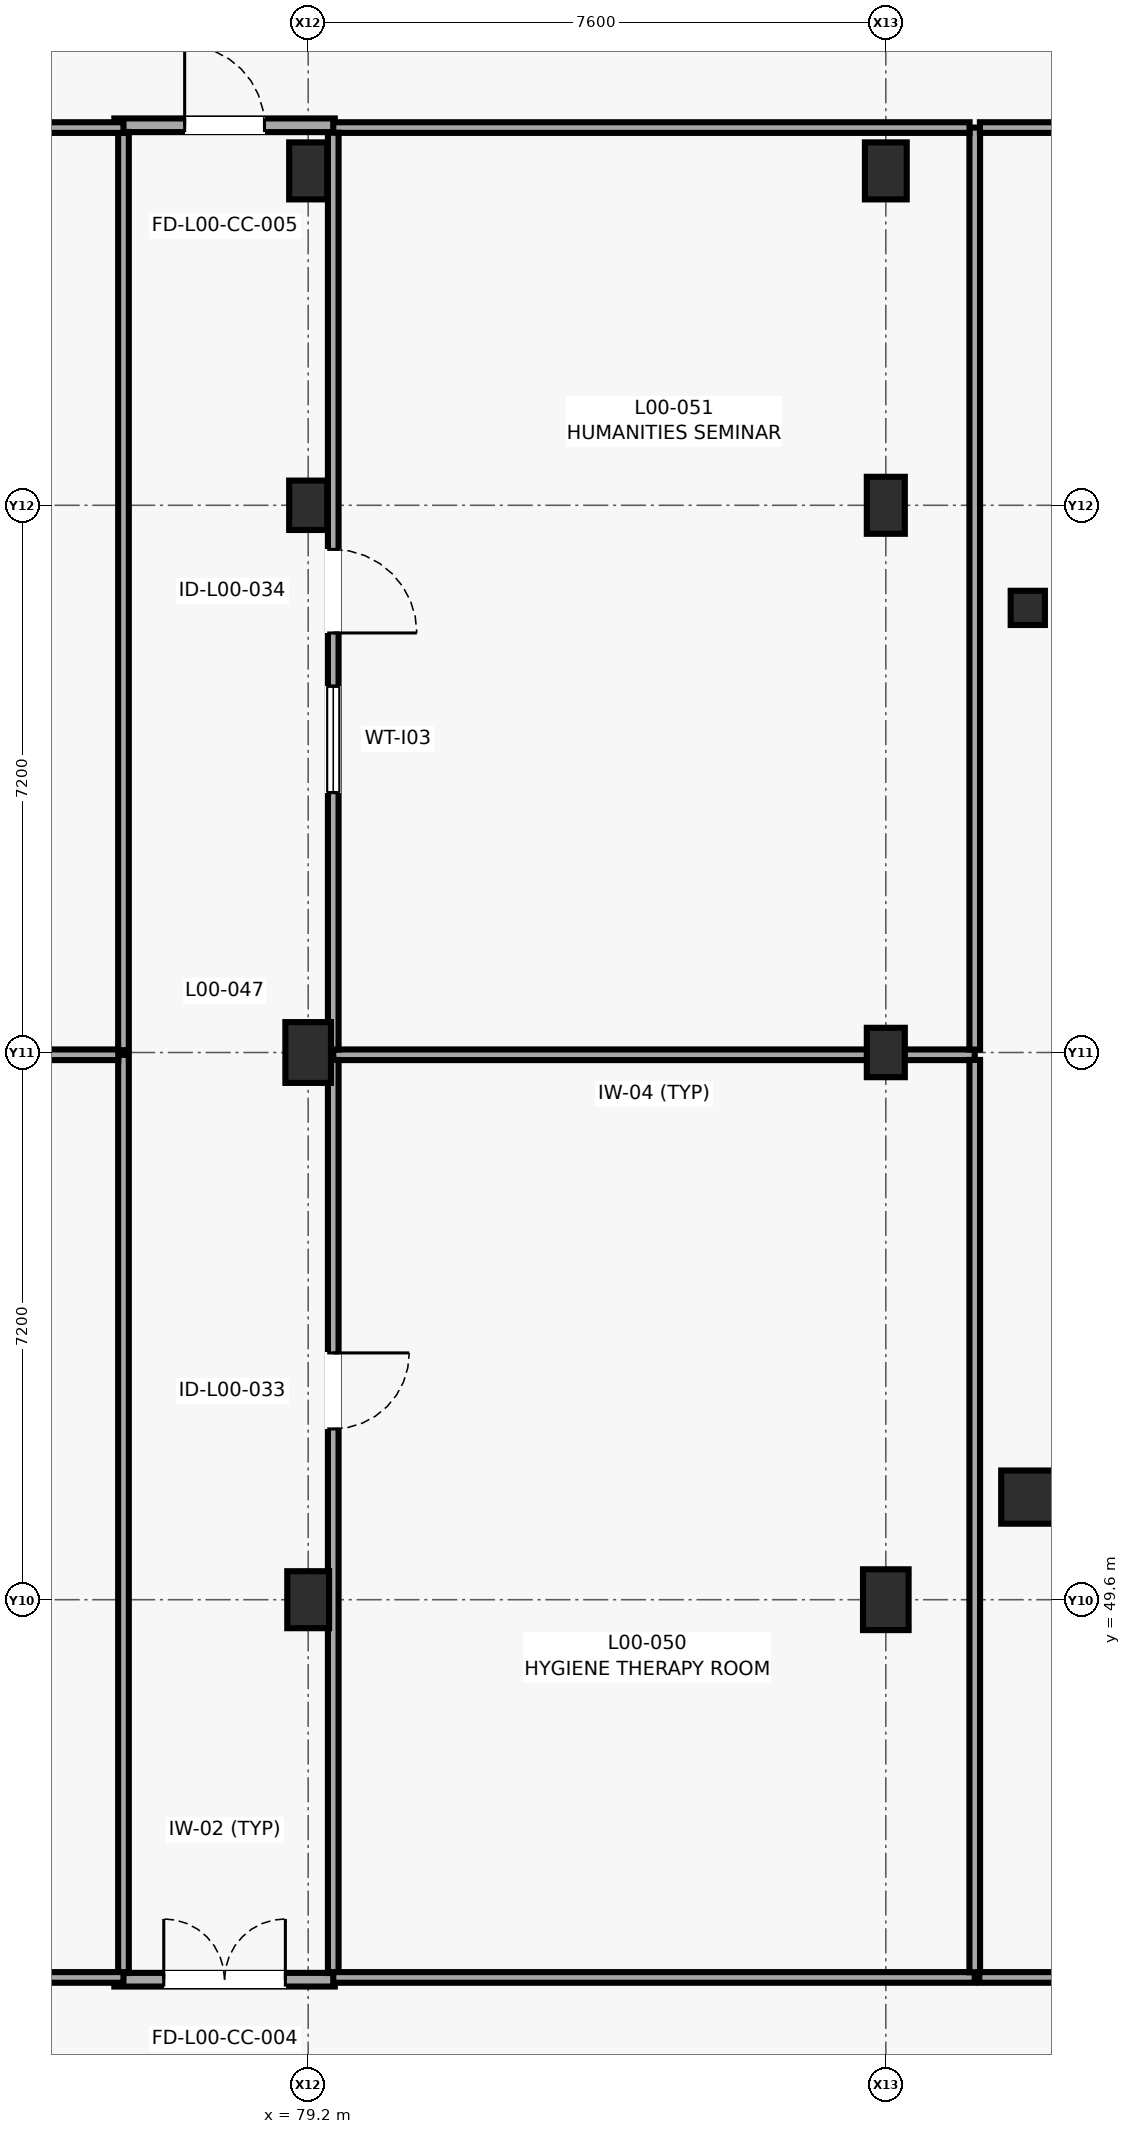
"""IFC4 building model, lengths in metres.
Left out: names, types, materials, properties, quantities, classifications, styles, units other than length and angle.
Written with IfcOpenShell. Run it as: python <this file> out.ifc"""

import sys

from ifc_helpers import new_model, si_unit, direction, frame, frame_2d, origin, origin_2d, place, context, subcontext, project, spatial, rectangle, circle, extrude, element, fill, save


model = new_model("IFC4")
c1 = context("Model", 3, precision=1e-05, world=origin(), true_north=direction((0.0, 1.0)))
c2 = subcontext(c1, "Body", "Model", "MODEL_VIEW")
j1 = project(units=[si_unit("LENGTHUNIT", "METRE"), si_unit("PLANEANGLEUNIT", "RADIAN")], contexts=[c1])
p1 = place(None, origin())
s1 = spatial("IfcSite", under=j1, at=p1, CompositionType="ELEMENT")
p2 = place(p1, origin())
s2 = spatial("IfcBuilding", under=s1, at=p2, CompositionType="ELEMENT")
p3 = place(p2, origin())
s3 = spatial("IfcBuildingStorey", under=s2, at=p3, CompositionType="ELEMENT", Elevation=0.0)
p4 = place(p3, frame((79.2, 49.6, 0.0), z_axis=(0.0, 0.0, 1.0), x_axis=(1.0, 0.0, 0.0)))
e1 = element("IfcColumn", 1, at=p4, inside=s3, PredefinedType="COLUMN", context=c2, shape_type="SweptSolid", body=[
    extrude(rectangle(XDim=0.55, YDim=0.75, at=origin_2d()), origin(), (0.0, 0.0, 1.0), 4.2),
])
p5 = place(p3, frame((79.2, 56.8, 0.0), z_axis=(0.0, 0.0, 1.0), x_axis=(1.0, 0.0, 0.0)))
e2 = element("IfcColumn", 2, at=p5, inside=s3, PredefinedType="COLUMN", context=c2, shape_type="SweptSolid", body=[
    extrude(rectangle(XDim=0.6, YDim=0.8, at=origin_2d()), origin(), (0.0, 0.0, 1.0), 4.2),
])
p6 = place(p3, frame((79.2, 64.0, 0.0), z_axis=(0.0, 0.0, 1.0), x_axis=(1.0, 0.0, 0.0)))
e3 = element("IfcColumn", 3, at=p6, inside=s3, PredefinedType="COLUMN", context=c2, shape_type="SweptSolid", body=[
    extrude(rectangle(XDim=0.5, YDim=0.65, at=origin_2d()), origin(), (0.0, 0.0, 1.0), 4.2),
])
p7 = place(p3, frame((79.2, 68.4, 0.0), z_axis=(0.0, 0.0, 1.0), x_axis=(1.0, 0.0, 0.0)))
e4 = element("IfcColumn", 4, at=p7, inside=s3, PredefinedType="COLUMN", context=c2, shape_type="SweptSolid", body=[
    extrude(rectangle(XDim=0.5, YDim=0.75, at=origin_2d()), origin(), (0.0, 0.0, 1.0), 4.2),
])
p8 = place(p3, frame((86.8, 49.6, 0.0), z_axis=(0.0, 0.0, 1.0), x_axis=(1.0, 0.0, 0.0)))
e5 = element("IfcColumn", 5, at=p8, inside=s3, PredefinedType="COLUMN", context=c2, shape_type="SweptSolid", body=[
    extrude(rectangle(XDim=0.6, YDim=0.8, at=origin_2d()), origin(), (0.0, 0.0, 1.0), 4.2),
])
p9 = place(p3, frame((86.8, 56.8, 0.0), z_axis=(0.0, 0.0, 1.0), x_axis=(1.0, 0.0, 0.0)))
e6 = element("IfcColumn", 6, at=p9, inside=s3, PredefinedType="COLUMN", context=c2, shape_type="SweptSolid", body=[
    extrude(rectangle(XDim=0.5, YDim=0.65, at=origin_2d()), origin(), (0.0, 0.0, 1.0), 4.2),
])
p10 = place(p3, frame((86.8, 64.0, 0.0), z_axis=(0.0, 0.0, 1.0), x_axis=(1.0, 0.0, 0.0)))
e7 = element("IfcColumn", 7, at=p10, inside=s3, PredefinedType="COLUMN", context=c2, shape_type="SweptSolid", body=[
    extrude(rectangle(XDim=0.5, YDim=0.75, at=origin_2d()), origin(), (0.0, 0.0, 1.0), 4.2),
])
p11 = place(p3, frame((86.8, 68.4, 0.0), z_axis=(0.0, 0.0, 1.0), x_axis=(1.0, 0.0, 0.0)))
e8 = element("IfcColumn", 8, at=p11, inside=s3, PredefinedType="COLUMN", context=c2, shape_type="SweptSolid", body=[
    extrude(rectangle(XDim=0.55, YDim=0.75, at=origin_2d()), origin(), (0.0, 0.0, 1.0), 4.2),
])
p12 = place(p3, frame((88.668, 50.95, 0.0), z_axis=(0.0, 0.0, 1.0), x_axis=(1.0, 0.0, 0.0)))
e9 = element("IfcColumn", 9, at=p12, inside=s3, PredefinedType="COLUMN", context=c2, shape_type="SweptSolid", body=[
    extrude(circle(Radius=0.35, at=origin_2d()), origin(), (0.0, 0.0, 1.0), 4.2),
])
p13 = place(p3, frame((88.668, 62.65, 0.0), z_axis=(0.0, 0.0, 1.0), x_axis=(1.0, 0.0, 0.0)))
e10 = element("IfcColumn", 10, at=p13, inside=s3, PredefinedType="COLUMN", context=c2, shape_type="SweptSolid", body=[
    extrude(circle(Radius=0.225, at=origin_2d()), origin(), (0.0, 0.0, 1.0), 4.2),
])
p14 = place(p3, frame((76.65, 44.6, 0.0), z_axis=(0.0, 0.0, 1.0), x_axis=(1.0, 0.0, 0.0)))
e11 = element("IfcWall", 11, at=p14, inside=s3, PredefinedType="PARTITIONING", context=c2, shape_type="SweptSolid", body=[
    extrude(rectangle(XDim=2.9, YDim=0.18, at=frame_2d((1.45, 0.0))), origin(), (0.0, 0.0, 1.0), 3.98),
])
p15 = place(p14, frame((0.65, 0.0, 0.0)))
e12 = element("IfcOpeningElement", 12, at=p15, cuts=e11, PredefinedType="OPENING", context=c2, shape_type="SweptSolid", body=[
    extrude(rectangle(XDim=1.6, YDim=2.25, at=frame_2d((0.8, 1.125))), frame((0.0, 0.1, 0.0), z_axis=(0.0, -1.0, 0.0), x_axis=(1.0, 0.0, 0.0)), (0.0, 0.0, 1.0), 0.2),
])
p16 = place(p3, frame((76.65, 69.0, 0.0), z_axis=(0.0, 0.0, 1.0), x_axis=(1.0, 0.0, 0.0)))
e13 = element("IfcWall", 13, at=p16, inside=s3, PredefinedType="PARTITIONING", context=c2, shape_type="SweptSolid", body=[
    extrude(rectangle(XDim=2.9, YDim=0.18, at=frame_2d((1.45, 0.0))), origin(), (0.0, 0.0, 1.0), 3.98),
])
p17 = place(p16, frame((0.925, 0.0, 0.0)))
e14 = element("IfcOpeningElement", 14, at=p17, cuts=e13, PredefinedType="OPENING", context=c2, shape_type="SweptSolid", body=[
    extrude(rectangle(XDim=1.05, YDim=2.15, at=frame_2d((0.525, 1.075))), frame((0.0, 0.1, 0.0), z_axis=(0.0, -1.0, 0.0), x_axis=(1.0, 0.0, 0.0)), (0.0, 0.0, 1.0), 0.2),
])
p18 = place(p3, frame((87.97, 56.77, 0.0), z_axis=(0.0, 0.0, 1.0), x_axis=(-1.0, 0.0, 0.0)))
e15 = element("IfcWall", 15, at=p18, inside=s3, PredefinedType="PARTITIONING", context=c2, shape_type="SweptSolid", body=[
    extrude(rectangle(XDim=8.44, YDim=0.14, at=frame_2d((4.22, 0.0))), origin(), (0.0, 0.0, 1.0), 3.225),
])
p19 = place(p3, frame((79.53, 56.702, 0.0), z_axis=(0.0, 0.0, 1.0), x_axis=(0.0, -1.0, 0.0)))
e16 = element("IfcWall", 16, at=p19, inside=s3, PredefinedType="PARTITIONING", context=c2, shape_type="SweptSolid", body=[
    extrude(rectangle(XDim=12.014, YDim=0.14, at=frame_2d((6.007, 0.0))), origin(), (0.0, 0.0, 1.0), 3.975),
])
p20 = place(p19, frame((3.855, 0.0, 0.0)))
e17 = element("IfcOpeningElement", 17, at=p20, cuts=e16, PredefinedType="OPENING", context=c2, shape_type="SweptSolid", body=[
    extrude(rectangle(XDim=1.0, YDim=2.1, at=frame_2d((0.5, 1.05))), frame((0.0, 0.08, 0.0), z_axis=(0.0, -1.0, 0.0), x_axis=(1.0, 0.0, 0.0)), (0.0, 0.0, 1.0), 0.16),
])
p21 = place(p3, frame((79.53, 44.63, 0.0), z_axis=(0.0, 0.0, 1.0), x_axis=(1.0, 0.0, 0.0)))
e18 = element("IfcWall", 18, at=p21, inside=s3, PredefinedType="PARTITIONING", context=c2, shape_type="SweptSolid", body=[
    extrude(rectangle(XDim=8.44, YDim=0.14, at=frame_2d((4.22, 0.0))), origin(), (0.0, 0.0, 1.0), 3.975),
])
p22 = place(p3, frame((87.97, 44.698, 0.0), z_axis=(0.0, 0.0, 1.0), x_axis=(0.0, 1.0, 0.0)))
e19 = element("IfcWall", 19, at=p22, inside=s3, PredefinedType="PARTITIONING", context=c2, shape_type="SweptSolid", body=[
    extrude(rectangle(XDim=12.004, YDim=0.14, at=frame_2d((6.002, 0.0))), origin(), (0.0, 0.0, 1.0), 3.975),
])
p23 = place(p3, frame((87.97, 56.838, 0.0), z_axis=(0.0, 0.0, 1.0), x_axis=(0.0, 1.0, 0.0)))
e20 = element("IfcWall", 20, at=p23, inside=s3, PredefinedType="PARTITIONING", context=c2, shape_type="SweptSolid", body=[
    extrude(rectangle(XDim=12.132, YDim=0.14, at=frame_2d((6.066, 0.0))), origin(), (0.0, 0.0, 1.0), 3.975),
])
p24 = place(p3, frame((87.902, 68.97, 0.0), z_axis=(0.0, 0.0, 1.0), x_axis=(-1.0, 0.0, 0.0)))
e21 = element("IfcWall", 21, at=p24, inside=s3, PredefinedType="PARTITIONING", context=c2, shape_type="SweptSolid", body=[
    extrude(rectangle(XDim=8.372, YDim=0.14, at=frame_2d((4.186, 0.0))), origin(), (0.0, 0.0, 1.0), 3.975),
])
p25 = place(p3, frame((79.53, 68.902, 0.0), z_axis=(0.0, 0.0, 1.0), x_axis=(0.0, -1.0, 0.0)))
e22 = element("IfcWall", 22, at=p25, inside=s3, PredefinedType="PARTITIONING", context=c2, shape_type="SweptSolid", body=[
    extrude(rectangle(XDim=12.064, YDim=0.14, at=frame_2d((6.032, 0.0))), origin(), (0.0, 0.0, 1.0), 3.975),
])
p26 = place(p25, frame((5.482, 0.0, 0.0)))
e23 = element("IfcOpeningElement", 23, at=p26, cuts=e22, PredefinedType="OPENING", context=c2, shape_type="SweptSolid", body=[
    extrude(rectangle(XDim=1.1, YDim=2.1, at=frame_2d((0.55, 1.05))), frame((0.0, 0.08, 0.0), z_axis=(0.0, -1.0, 0.0), x_axis=(1.0, 0.0, 0.0)), (0.0, 0.0, 1.0), 0.16),
])
p27 = place(p25, frame((7.282, 0.0, 1.05)))
e24 = element("IfcOpeningElement", 24, at=p27, cuts=e22, PredefinedType="OPENING", context=c2, shape_type="SweptSolid", body=[
    extrude(rectangle(XDim=1.4, YDim=1.05, at=frame_2d((0.7, 0.525))), frame((0.0, 0.08, 0.0), z_axis=(0.0, -1.0, 0.0), x_axis=(1.0, 0.0, 0.0)), (0.0, 0.0, 1.0), 0.16),
])
p28 = place(p3, frame((76.77, 44.688, 0.0), z_axis=(0.0, 0.0, 1.0), x_axis=(0.0, 1.0, 0.0)))
e25 = element("IfcWall", 25, at=p28, inside=s3, PredefinedType="PARTITIONING", context=c2, shape_type="SweptSolid", body=[
    extrude(rectangle(XDim=12.082, YDim=0.14, at=frame_2d((6.041, 0.0))), origin(), (0.0, 0.0, 1.0), 3.975),
])
p29 = place(p3, frame((76.702, 56.77, 0.0), z_axis=(0.0, 0.0, 1.0), x_axis=(-1.0, 0.0, 0.0)))
e26 = element("IfcWall", 26, at=p29, inside=s3, PredefinedType="PARTITIONING", context=c2, shape_type="SweptSolid", body=[
    extrude(rectangle(XDim=2.086, YDim=0.14, at=frame_2d((1.043, 0.0))), origin(), (0.0, 0.0, 1.0), 3.975),
])
p30 = place(p3, frame((63.43, 44.63, 0.0), z_axis=(0.0, 0.0, 1.0), x_axis=(1.0, 0.0, 0.0)))
e27 = element("IfcWall", 27, at=p30, inside=s3, PredefinedType="PARTITIONING", context=c2, shape_type="SweptSolid", body=[
    extrude(rectangle(XDim=13.34, YDim=0.14, at=frame_2d((6.67, 0.0))), origin(), (0.0, 0.0, 1.0), 3.975),
])
p31 = place(p30, frame((6.12, 0.0, 0.0)))
e28 = element("IfcOpeningElement", 28, at=p31, cuts=e27, PredefinedType="OPENING", context=c2, shape_type="SweptSolid", body=[
    extrude(rectangle(XDim=1.1, YDim=2.1, at=frame_2d((0.55, 1.05))), frame((0.0, 0.08, 0.0), z_axis=(0.0, -1.0, 0.0), x_axis=(1.0, 0.0, 0.0)), (0.0, 0.0, 1.0), 0.16),
])
p32 = place(p30, frame((7.92, 0.0, 1.05)))
e29 = element("IfcOpeningElement", 29, at=p32, cuts=e27, PredefinedType="OPENING", context=c2, shape_type="SweptSolid", body=[
    extrude(rectangle(XDim=1.4, YDim=1.05, at=frame_2d((0.7, 0.525))), frame((0.0, 0.08, 0.0), z_axis=(0.0, -1.0, 0.0), x_axis=(1.0, 0.0, 0.0)), (0.0, 0.0, 1.0), 0.16),
])
p33 = place(p3, frame((76.77, 56.83, 0.0), z_axis=(0.0, 0.0, 1.0), x_axis=(0.0, 1.0, 0.0)))
e30 = element("IfcWall", 30, at=p33, inside=s3, PredefinedType="PARTITIONING", context=c2, shape_type="SweptSolid", body=[
    extrude(rectangle(XDim=12.082, YDim=0.14, at=frame_2d((6.041, 0.0))), origin(), (0.0, 0.0, 1.0), 3.975),
])
p34 = place(p3, frame((76.77, 68.97, 0.0), z_axis=(0.0, 0.0, 1.0), x_axis=(-1.0, 0.0, 0.0)))
e31 = element("IfcWall", 31, at=p34, inside=s3, PredefinedType="PARTITIONING", context=c2, shape_type="SweptSolid", body=[
    extrude(rectangle(XDim=13.34, YDim=0.14, at=frame_2d((6.67, 0.0))), origin(), (0.0, 0.0, 1.0), 3.975),
])
p35 = place(p34, frame((6.16, 0.0, 0.0)))
e32 = element("IfcOpeningElement", 32, at=p35, cuts=e31, PredefinedType="OPENING", context=c2, shape_type="SweptSolid", body=[
    extrude(rectangle(XDim=1.02, YDim=2.14, at=frame_2d((0.51, 1.07))), frame((0.0, 0.08, 0.0), z_axis=(0.0, -1.0, 0.0), x_axis=(1.0, 0.0, 0.0)), (0.0, 0.0, 1.0), 0.16),
])
p36 = place(p34, frame((7.88, 0.0, 1.05)))
e33 = element("IfcOpeningElement", 33, at=p36, cuts=e31, PredefinedType="OPENING", context=c2, shape_type="SweptSolid", body=[
    extrude(rectangle(XDim=1.6, YDim=1.1, at=frame_2d((0.8, 0.55))), frame((0.0, 0.08, 0.0), z_axis=(0.0, -1.0, 0.0), x_axis=(1.0, 0.0, 0.0)), (0.0, 0.0, 1.0), 0.16),
])
p37 = place(p3, frame((88.03, 44.63, 0.0), z_axis=(0.0, 0.0, 1.0), x_axis=(1.0, 0.0, 0.0)))
e34 = element("IfcWall", 34, at=p37, inside=s3, PredefinedType="PARTITIONING", context=c2, shape_type="SweptSolid", body=[
    extrude(rectangle(XDim=10.732, YDim=0.14, at=frame_2d((5.366, 0.0))), origin(), (0.0, 0.0, 1.0), 3.975),
])
p38 = place(p37, frame((4.866, 0.0, 0.0)))
e35 = element("IfcOpeningElement", 35, at=p38, cuts=e34, PredefinedType="OPENING", context=c2, shape_type="SweptSolid", body=[
    extrude(rectangle(XDim=1.0, YDim=2.1, at=frame_2d((0.5, 1.05))), frame((0.0, 0.08, 0.0), z_axis=(0.0, -1.0, 0.0), x_axis=(1.0, 0.0, 0.0)), (0.0, 0.0, 1.0), 0.16),
])
p39 = place(p37, frame((6.566, 0.0, 1.05)))
e36 = element("IfcOpeningElement", 36, at=p39, cuts=e34, PredefinedType="OPENING", context=c2, shape_type="SweptSolid", body=[
    extrude(rectangle(XDim=1.6, YDim=1.1, at=frame_2d((0.8, 0.55))), frame((0.0, 0.08, 0.0), z_axis=(0.0, -1.0, 0.0), x_axis=(1.0, 0.0, 0.0)), (0.0, 0.0, 1.0), 0.16),
])
p40 = place(p3, frame((98.77, 68.97, 0.0), z_axis=(0.0, 0.0, 1.0), x_axis=(-1.0, 0.0, 0.0)))
e37 = element("IfcWall", 37, at=p40, inside=s3, PredefinedType="PARTITIONING", context=c2, shape_type="SweptSolid", body=[
    extrude(rectangle(XDim=10.732, YDim=0.14, at=frame_2d((5.366, 0.0))), origin(), (0.0, 0.0, 1.0), 3.975),
])
p41 = place(p40, frame((4.741, 0.0, 0.0)))
e38 = element("IfcOpeningElement", 38, at=p41, cuts=e37, PredefinedType="OPENING", context=c2, shape_type="SweptSolid", body=[
    extrude(rectangle(XDim=1.25, YDim=2.22, at=frame_2d((0.625, 1.11))), frame((0.0, 0.08, 0.0), z_axis=(0.0, -1.0, 0.0), x_axis=(1.0, 0.0, 0.0)), (0.0, 0.0, 1.0), 0.16),
])
p42 = place(p40, frame((6.691, 0.0, 1.05)))
e39 = element("IfcOpeningElement", 39, at=p42, cuts=e37, PredefinedType="OPENING", context=c2, shape_type="SweptSolid", body=[
    extrude(rectangle(XDim=1.8, YDim=1.2, at=frame_2d((0.9, 0.6))), frame((0.0, 0.08, 0.0), z_axis=(0.0, -1.0, 0.0), x_axis=(1.0, 0.0, 0.0)), (0.0, 0.0, 1.0), 0.16),
])
p43 = place(p15, origin())
e40 = element("IfcDoor", 40, at=p43, inside=s3, OperationType="DOUBLE_DOOR_SINGLE_SWING", PredefinedType="DOOR", context=c2, shape_type="SweptSolid", body=[
    extrude(rectangle(XDim=1.6, YDim=2.25, at=frame_2d((0.8, 1.125))), frame((0.0, 0.025, 0.0), z_axis=(0.0, -1.0, 0.0), x_axis=(1.0, 0.0, 0.0)), (0.0, 0.0, 1.0), 0.05),
])
fill(e12, e40)
p44 = place(p17, origin())
e41 = element("IfcDoor", 41, at=p44, inside=s3, OperationType="SINGLE_SWING_LEFT", PredefinedType="DOOR", context=c2, shape_type="SweptSolid", body=[
    extrude(rectangle(XDim=1.05, YDim=2.15, at=frame_2d((0.525, 1.075))), frame((0.0, 0.025, 0.0), z_axis=(0.0, -1.0, 0.0), x_axis=(1.0, 0.0, 0.0)), (0.0, 0.0, 1.0), 0.05),
])
fill(e14, e41)
p45 = place(p20, origin())
e42 = element("IfcDoor", 42, at=p45, inside=s3, OperationType="SINGLE_SWING_LEFT", PredefinedType="DOOR", context=c2, shape_type="SweptSolid", body=[
    extrude(rectangle(XDim=1.0, YDim=2.1, at=frame_2d((0.5, 1.05))), frame((0.0, 0.025, 0.0), z_axis=(0.0, -1.0, 0.0), x_axis=(1.0, 0.0, 0.0)), (0.0, 0.0, 1.0), 0.05),
])
fill(e17, e42)
p46 = place(p26, origin())
e43 = element("IfcDoor", 43, at=p46, inside=s3, OperationType="SINGLE_SWING_RIGHT", PredefinedType="DOOR", context=c2, shape_type="SweptSolid", body=[
    extrude(rectangle(XDim=1.1, YDim=2.1, at=frame_2d((0.55, 1.05))), frame((0.0, 0.025, 0.0), z_axis=(0.0, -1.0, 0.0), x_axis=(1.0, 0.0, 0.0)), (0.0, 0.0, 1.0), 0.05),
])
fill(e23, e43)
p47 = place(p27, origin())
e44 = element("IfcWindow", 44, at=p47, inside=s3, PartitioningType="SINGLE_PANEL", PredefinedType="WINDOW", context=c2, shape_type="SweptSolid", body=[
    extrude(rectangle(XDim=1.4, YDim=1.05, at=frame_2d((0.7, 0.525))), frame((0.0, 0.03, 0.0), z_axis=(0.0, -1.0, 0.0), x_axis=(1.0, 0.0, 0.0)), (0.0, 0.0, 1.0), 0.06),
])
fill(e24, e44)
save(model, sys.argv[1])
